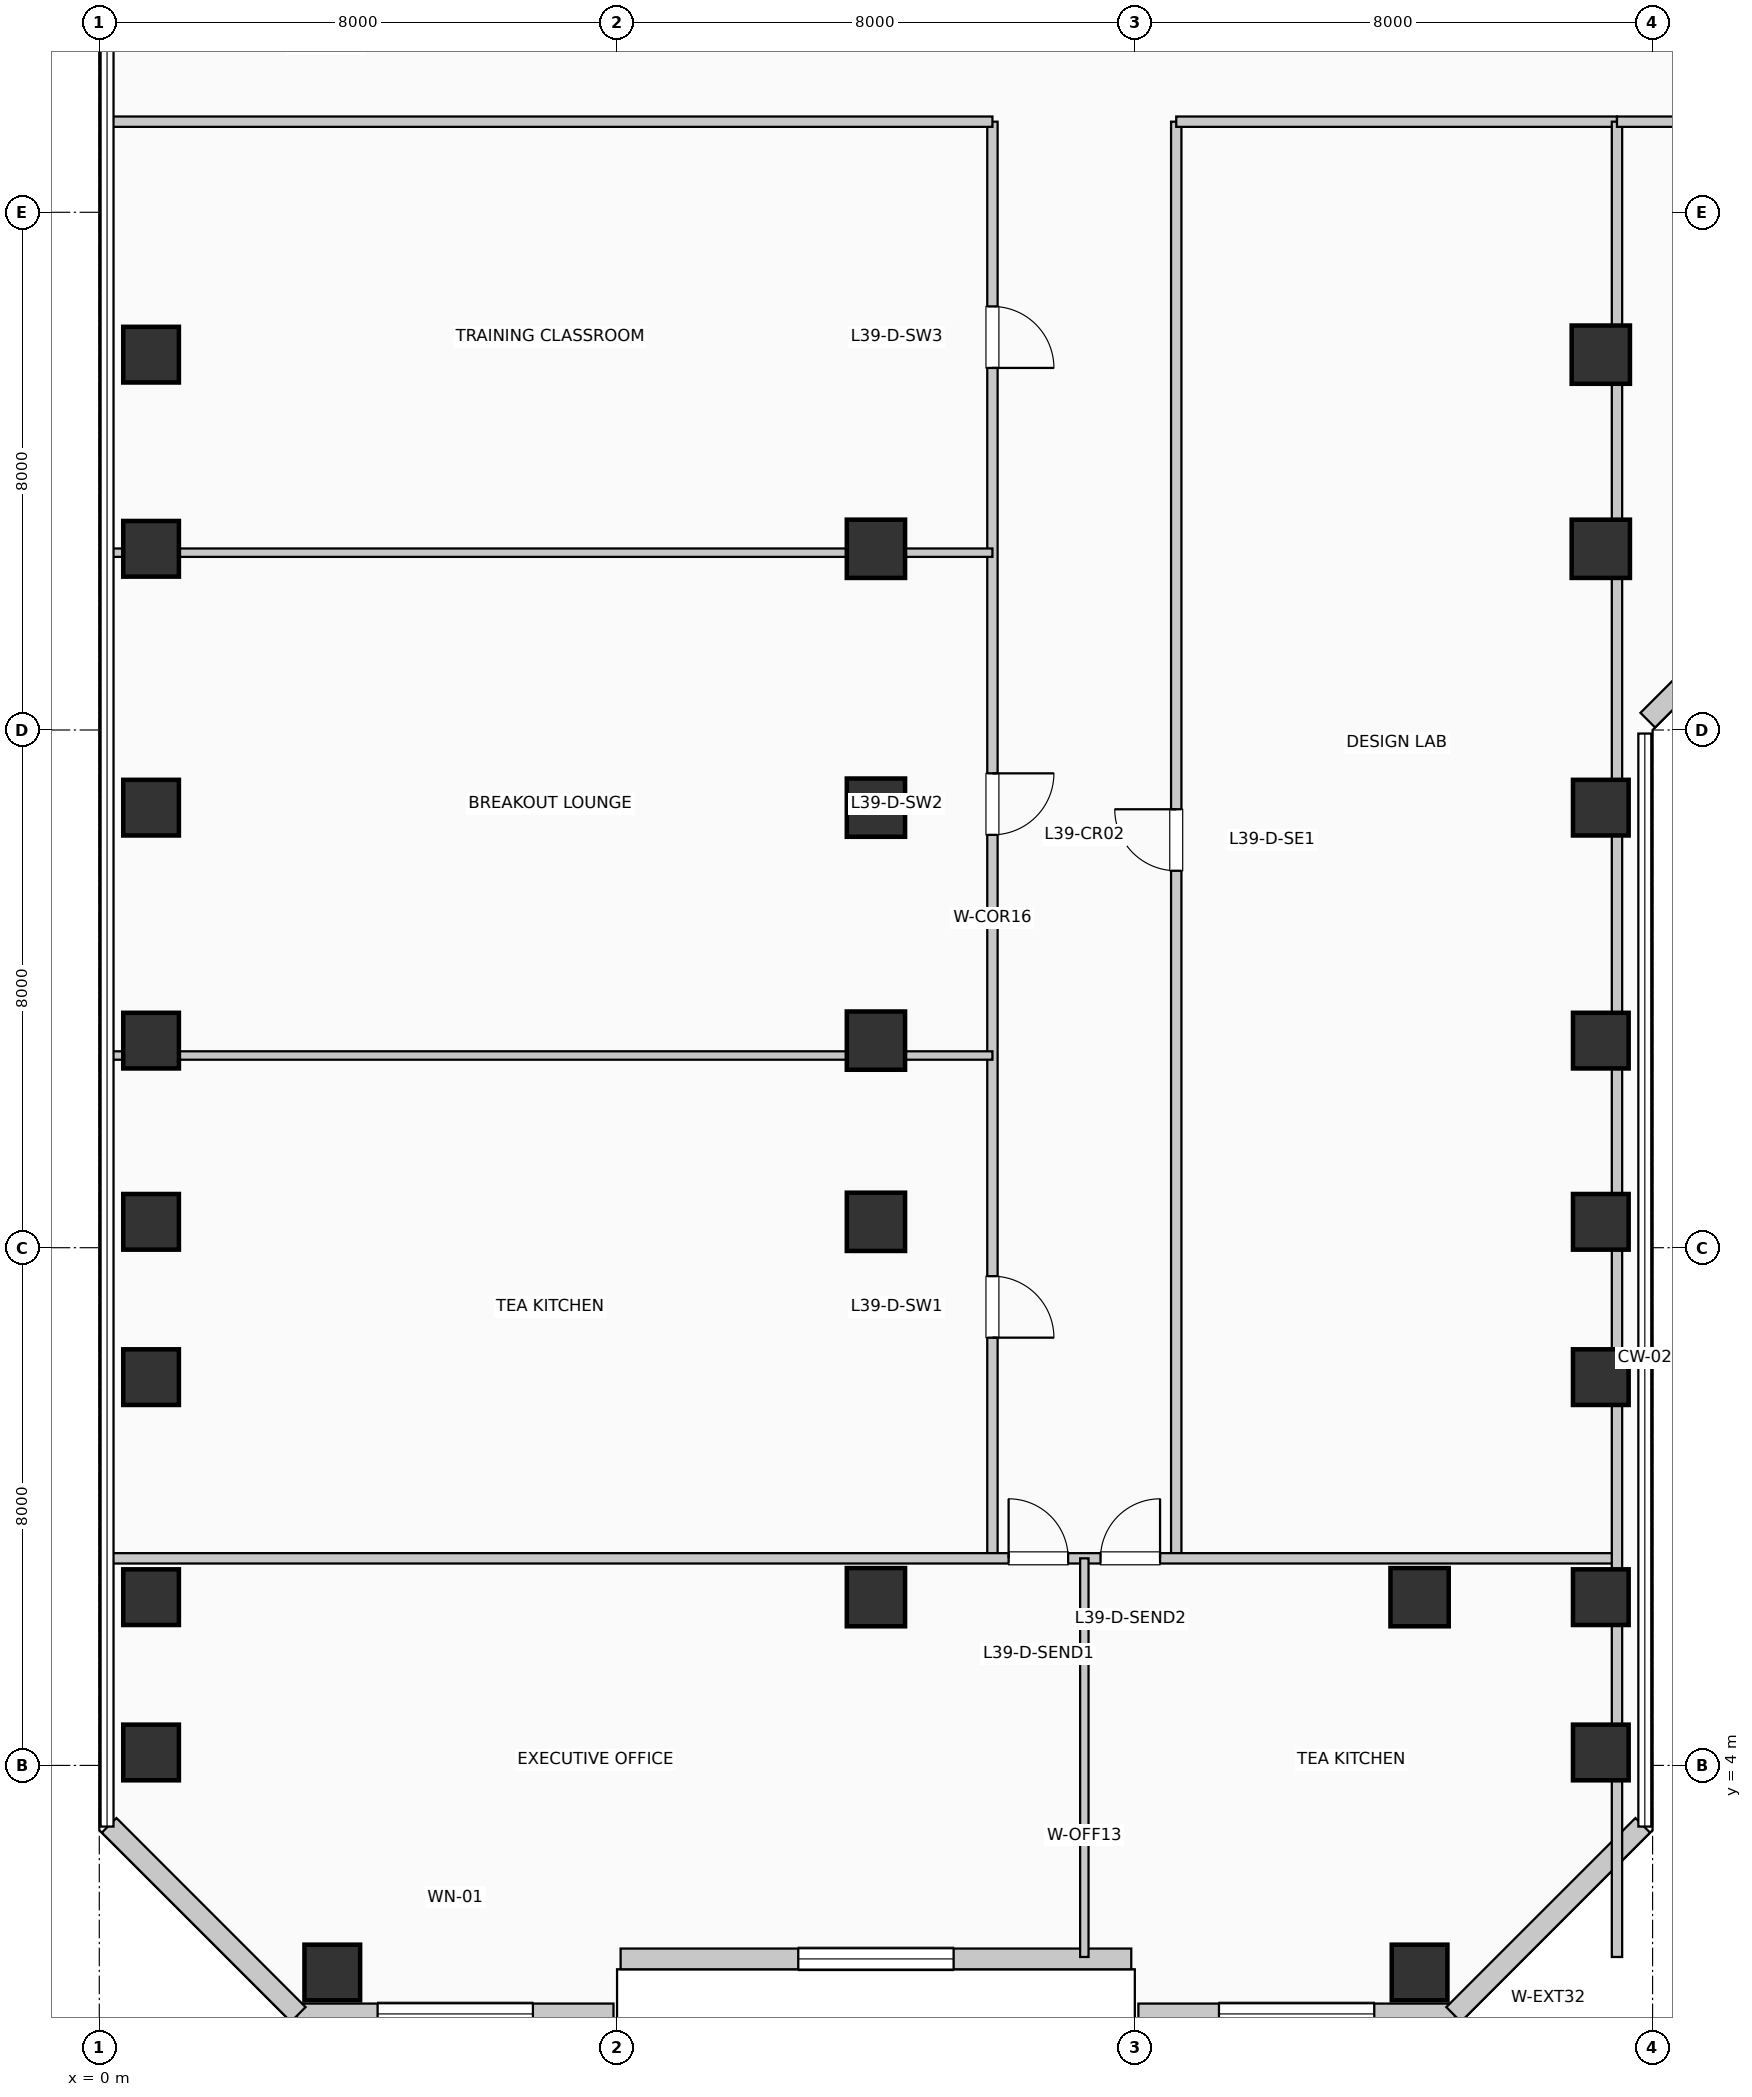
"""IFC4 building model, lengths in metres.
Left out: names, types, materials, properties, quantities, classifications, styles, units other than length and angle.
Written with IfcOpenShell. Run it as: python <this file> out.ifc"""

import sys

from ifc_helpers import new_model, si_unit, direction, frame, frame_2d, origin, origin_2d, place, context, subcontext, project, spatial, rectangle, extrude, element, fill, save


model = new_model("IFC4")
c1 = context("Model", 3, precision=1e-05, world=origin(), true_north=direction((0.0, 1.0)))
c2 = subcontext(c1, "Body", "Model", "MODEL_VIEW")
j1 = project(units=[si_unit("LENGTHUNIT", "METRE"), si_unit("PLANEANGLEUNIT", "RADIAN")], contexts=[c1])
p1 = place(None, origin())
s1 = spatial("IfcSite", under=j1, at=p1, CompositionType="ELEMENT")
p2 = place(p1, origin())
s2 = spatial("IfcBuilding", under=s1, at=p2, CompositionType="ELEMENT")
p3 = place(p2, frame((0.0, 0.0, 162.69)))
s3 = spatial("IfcBuildingStorey", under=s2, at=p3, CompositionType="ELEMENT", Elevation=162.69)
for number, where, z_axis, x_axis in (
    (1, (0.8, 4.2, 0.0), (0.0, 0.0, 1.0), (1.0, 0.0, 0.0)),
    (2, (0.8, 6.6, 0.0), (0.0, 0.0, 1.0), (1.0, 0.0, 0.0)),
    (3, (0.8, 10.0, 0.0), (0.0, 0.0, 1.0), (1.0, 0.0, 0.0)),
    (4, (0.8, 12.4, 0.0), (0.0, 0.0, 1.0), (1.0, 0.0, 0.0)),
    (5, (0.8, 15.2, 0.0), (0.0, 0.0, 1.0), (1.0, 0.0, 0.0)),
    (6, (0.8, 18.8, 0.0), (0.0, 0.0, 1.0), (1.0, 0.0, 0.0)),
    (7, (0.8, 22.8, 0.0), (0.0, 0.0, 1.0), (1.0, 0.0, 0.0)),
    (8, (0.8, 25.8, 0.0), (0.0, 0.0, 1.0), (1.0, 0.0, 0.0)),
    (9, (3.6, 0.8, 0.0), (0.0, 0.0, 1.0), (1.0, 0.0, 0.0)),
):
    element("IfcColumn", number, at=place(p3, frame(where, z_axis=z_axis, x_axis=x_axis)), inside=s3, PredefinedType="COLUMN", context=c2, shape_type="SweptSolid", body=[
        extrude(rectangle(XDim=0.86, YDim=0.86, at=origin_2d()), origin(), (0.0, 0.0, 1.0), 3.96),
    ])
for number, where, z_axis, x_axis in (
    (10, (12.0, 6.6, 0.0), (0.0, 0.0, 1.0), (1.0, 0.0, 0.0)),
    (11, (12.0, 12.4, 0.0), (0.0, 0.0, 1.0), (1.0, 0.0, 0.0)),
    (12, (12.0, 15.2, 0.0), (0.0, 0.0, 1.0), (1.0, 0.0, 0.0)),
    (13, (12.0, 18.8, 0.0), (0.0, 0.0, 1.0), (1.0, 0.0, 0.0)),
    (14, (12.0, 22.8, 0.0), (0.0, 0.0, 1.0), (1.0, 0.0, 0.0)),
):
    element("IfcColumn", number, at=place(p3, frame(where, z_axis=z_axis, x_axis=x_axis)), inside=s3, PredefinedType="COLUMN", context=c2, shape_type="SweptSolid", body=[
        extrude(rectangle(XDim=0.9, YDim=0.9, at=origin_2d()), origin(), (0.0, 0.0, 1.0), 3.96),
    ])
p4 = place(p3, frame((20.4, 0.8, 0.0), z_axis=(0.0, 0.0, 1.0), x_axis=(1.0, 0.0, 0.0)))
e15 = element("IfcColumn", 15, at=p4, inside=s3, PredefinedType="COLUMN", context=c2, shape_type="SweptSolid", body=[
    extrude(rectangle(XDim=0.86, YDim=0.86, at=origin_2d()), origin(), (0.0, 0.0, 1.0), 3.96),
])
p5 = place(p3, frame((20.4, 6.6, 0.0), z_axis=(0.0, 0.0, 1.0), x_axis=(1.0, 0.0, 0.0)))
e16 = element("IfcColumn", 16, at=p5, inside=s3, PredefinedType="COLUMN", context=c2, shape_type="SweptSolid", body=[
    extrude(rectangle(XDim=0.9, YDim=0.9, at=origin_2d()), origin(), (0.0, 0.0, 1.0), 3.96),
])
for number, where, z_axis, x_axis in (
    (17, (23.2, 4.2, 0.0), (0.0, 0.0, 1.0), (1.0, 0.0, 0.0)),
    (18, (23.2, 6.6, 0.0), (0.0, 0.0, 1.0), (1.0, 0.0, 0.0)),
    (19, (23.2, 10.0, 0.0), (0.0, 0.0, 1.0), (1.0, 0.0, 0.0)),
    (20, (23.2, 12.4, 0.0), (0.0, 0.0, 1.0), (1.0, 0.0, 0.0)),
    (21, (23.2, 15.2, 0.0), (0.0, 0.0, 1.0), (1.0, 0.0, 0.0)),
    (22, (23.2, 18.8, 0.0), (0.0, 0.0, 1.0), (1.0, 0.0, 0.0)),
):
    element("IfcColumn", number, at=place(p3, frame(where, z_axis=z_axis, x_axis=x_axis)), inside=s3, PredefinedType="COLUMN", context=c2, shape_type="SweptSolid", body=[
        extrude(rectangle(XDim=0.86, YDim=0.86, at=origin_2d()), origin(), (0.0, 0.0, 1.0), 3.96),
    ])
for number, where, z_axis, x_axis in (
    (23, (23.2, 22.8, 0.0), (0.0, 0.0, 1.0), (1.0, 0.0, 0.0)),
    (24, (23.2, 25.8, 0.0), (0.0, 0.0, 1.0), (1.0, 0.0, 0.0)),
):
    element("IfcColumn", number, at=place(p3, frame(where, z_axis=z_axis, x_axis=x_axis)), inside=s3, PredefinedType="COLUMN", context=c2, shape_type="SweptSolid", body=[
        extrude(rectangle(XDim=0.9, YDim=0.9, at=origin_2d()), origin(), (0.0, 0.0, 1.0), 3.96),
    ])
p6 = place(p3, frame((3.055, 0.16, 0.0), z_axis=(0.0, 0.0, 1.0), x_axis=(1.0, 0.0, 0.0)))
e25 = element("IfcWall", 25, at=p6, inside=s3, PredefinedType="SOLIDWALL", context=c2, shape_type="SweptSolid", body=[
    extrude(rectangle(XDim=4.89, YDim=0.32, at=frame_2d((2.445, 0.0))), origin(), (0.0, 0.0, 1.0), 3.71),
])
p7 = place(p6, frame((1.245, 0.0, 0.85)))
e26 = element("IfcOpeningElement", 26, at=p7, cuts=e25, PredefinedType="OPENING", context=c2, shape_type="SweptSolid", body=[
    extrude(rectangle(XDim=2.4, YDim=2.05, at=frame_2d((1.2, 1.025))), frame((0.0, 0.17, 0.0), z_axis=(0.0, -1.0, 0.0), x_axis=(1.0, 0.0, 0.0)), (0.0, 0.0, 1.0), 0.34),
])
p8 = place(p3, frame((8.055, 1.01, 0.0), z_axis=(0.0, 0.0, 1.0), x_axis=(1.0, 0.0, 0.0)))
e27 = element("IfcWall", 27, at=p8, inside=s3, PredefinedType="SOLIDWALL", context=c2, shape_type="SweptSolid", body=[
    extrude(rectangle(XDim=7.89, YDim=0.32, at=frame_2d((3.945, 0.0))), origin(), (0.0, 0.0, 1.0), 3.71),
])
p9 = place(p8, frame((2.745, 0.0, 0.85)))
e28 = element("IfcOpeningElement", 28, at=p9, cuts=e27, PredefinedType="OPENING", context=c2, shape_type="SweptSolid", body=[
    extrude(rectangle(XDim=2.4, YDim=2.05, at=frame_2d((1.2, 1.025))), frame((0.0, 0.17, 0.0), z_axis=(0.0, -1.0, 0.0), x_axis=(1.0, 0.0, 0.0)), (0.0, 0.0, 1.0), 0.34),
])
p10 = place(p3, frame((16.055, 0.16, 0.0), z_axis=(0.0, 0.0, 1.0), x_axis=(1.0, 0.0, 0.0)))
e29 = element("IfcWall", 29, at=p10, inside=s3, PredefinedType="SOLIDWALL", context=c2, shape_type="SweptSolid", body=[
    extrude(rectangle(XDim=4.89, YDim=0.32, at=frame_2d((2.445, 0.0))), origin(), (0.0, 0.0, 1.0), 3.71),
])
p11 = place(p10, frame((1.245, 0.0, 0.85)))
e30 = element("IfcOpeningElement", 30, at=p11, cuts=e29, PredefinedType="OPENING", context=c2, shape_type="SweptSolid", body=[
    extrude(rectangle(XDim=2.4, YDim=2.05, at=frame_2d((1.2, 1.025))), frame((0.0, 0.17, 0.0), z_axis=(0.0, -1.0, 0.0), x_axis=(1.0, 0.0, 0.0)), (0.0, 0.0, 1.0), 0.34),
])
p12 = place(p3, frame((20.926, 0.152, 0.0), z_axis=(0.0, 0.0, 1.0), x_axis=(0.707106781187, 0.707106781187, 0.0)))
e31 = element("IfcWall", 31, at=p12, inside=s3, PredefinedType="SOLIDWALL", context=c2, shape_type="SweptSolid", body=[
    extrude(rectangle(XDim=4.133, YDim=0.32, at=frame_2d((2.066, 0.0))), origin(), (0.0, 0.0, 1.0), 3.71),
])
p13 = place(p3, frame((23.926, 20.152, 0.0), z_axis=(0.0, 0.0, 1.0), x_axis=(0.707106781187, 0.707106781187, 0.0)))
e32 = element("IfcWall", 32, at=p13, inside=s3, PredefinedType="SOLIDWALL", context=c2, shape_type="SweptSolid", body=[
    extrude(rectangle(XDim=2.718, YDim=0.32, at=frame_2d((1.359, 0.0))), origin(), (0.0, 0.0, 1.0), 3.71),
])
p14 = place(p3, frame((0.152, 3.074, 0.0), z_axis=(0.0, 0.0, 1.0), x_axis=(0.707106781187, -0.707106781187, 0.0)))
e33 = element("IfcWall", 33, at=p14, inside=s3, PredefinedType="SOLIDWALL", context=c2, shape_type="SweptSolid", body=[
    extrude(rectangle(XDim=4.133, YDim=0.32, at=frame_2d((2.066, 0.0))), origin(), (0.0, 0.0, 1.0), 3.71),
])
p15 = place(p3, frame((13.8, 7.2, 0.0), z_axis=(0.0, 0.0, 1.0), x_axis=(0.0, 1.0, 0.0)))
e34 = element("IfcWall", 34, at=p15, inside=s3, PredefinedType="PARTITIONING", context=c2, shape_type="SweptSolid", body=[
    extrude(rectangle(XDim=22.2, YDim=0.16, at=frame_2d((11.1, 0.0))), origin(), (0.0, 0.0, 1.0), 3.71),
])
p16 = place(p15, frame((4.36, 0.0, 0.0), z_axis=(0.0, 0.0, 1.0), x_axis=(-1.0, 0.0, 0.0)))
e35 = element("IfcOpeningElement", 35, at=p16, cuts=e34, PredefinedType="OPENING", context=c2, shape_type="SweptSolid", body=[
    extrude(rectangle(XDim=0.95, YDim=2.15, at=frame_2d((0.475, 1.075))), frame((0.0, 0.09, 0.0), z_axis=(0.0, -1.0, 0.0), x_axis=(1.0, 0.0, 0.0)), (0.0, 0.0, 1.0), 0.18),
])
p17 = place(p15, frame((12.13, 0.0, 0.0), z_axis=(0.0, 0.0, 1.0), x_axis=(-1.0, 0.0, 0.0)))
e36 = element("IfcOpeningElement", 36, at=p17, cuts=e34, PredefinedType="OPENING", context=c2, shape_type="SweptSolid", body=[
    extrude(rectangle(XDim=0.95, YDim=2.15, at=frame_2d((0.475, 1.075))), frame((0.0, 0.09, 0.0), z_axis=(0.0, -1.0, 0.0), x_axis=(1.0, 0.0, 0.0)), (0.0, 0.0, 1.0), 0.18),
])
p18 = place(p15, frame((19.345, 0.0, 0.0), z_axis=(0.0, 0.0, 1.0), x_axis=(-1.0, 0.0, 0.0)))
e37 = element("IfcOpeningElement", 37, at=p18, cuts=e34, PredefinedType="OPENING", context=c2, shape_type="SweptSolid", body=[
    extrude(rectangle(XDim=0.95, YDim=2.15, at=frame_2d((0.475, 1.075))), frame((0.0, 0.09, 0.0), z_axis=(0.0, -1.0, 0.0), x_axis=(1.0, 0.0, 0.0)), (0.0, 0.0, 1.0), 0.18),
])
p19 = place(p3, frame((16.64, 7.2, 0.0), z_axis=(0.0, 0.0, 1.0), x_axis=(0.0, 1.0, 0.0)))
e38 = element("IfcWall", 38, at=p19, inside=s3, PredefinedType="PARTITIONING", context=c2, shape_type="SweptSolid", body=[
    extrude(rectangle(XDim=22.2, YDim=0.16, at=frame_2d((11.1, 0.0))), origin(), (0.0, 0.0, 1.0), 3.71),
])
p20 = place(p19, frame((10.625, 0.0, 0.0)))
e39 = element("IfcOpeningElement", 39, at=p20, cuts=e38, PredefinedType="OPENING", context=c2, shape_type="SweptSolid", body=[
    extrude(rectangle(XDim=0.95, YDim=2.15, at=frame_2d((0.475, 1.075))), frame((0.0, 0.09, 0.0), z_axis=(0.0, -1.0, 0.0), x_axis=(1.0, 0.0, 0.0)), (0.0, 0.0, 1.0), 0.18),
])
p21 = place(p3, frame((0.19, 7.2, 0.0), z_axis=(0.0, 0.0, 1.0), x_axis=(1.0, 0.0, 0.0)))
e40 = element("IfcWall", 40, at=p21, inside=s3, PredefinedType="PARTITIONING", context=c2, shape_type="SweptSolid", body=[
    extrude(rectangle(XDim=23.26, YDim=0.16, at=frame_2d((11.63, 0.0))), origin(), (0.0, 0.0, 1.0), 3.71),
])
p22 = place(p21, frame((13.86, 0.0, 0.0)))
e41 = element("IfcOpeningElement", 41, at=p22, cuts=e40, PredefinedType="OPENING", context=c2, shape_type="SweptSolid", body=[
    extrude(rectangle(XDim=0.92, YDim=2.1, at=frame_2d((0.46, 1.05))), frame((0.0, 0.09, 0.0), z_axis=(0.0, -1.0, 0.0), x_axis=(1.0, 0.0, 0.0)), (0.0, 0.0, 1.0), 0.18),
])
p23 = place(p21, frame((15.28, 0.0, 0.0)))
e42 = element("IfcOpeningElement", 42, at=p23, cuts=e40, PredefinedType="OPENING", context=c2, shape_type="SweptSolid", body=[
    extrude(rectangle(XDim=0.92, YDim=2.1, at=frame_2d((0.46, 1.05))), frame((0.0, 0.09, 0.0), z_axis=(0.0, -1.0, 0.0), x_axis=(1.0, 0.0, 0.0)), (0.0, 0.0, 1.0), 0.18),
])
p24 = place(p3, frame((0.19, 29.4, 0.0), z_axis=(0.0, 0.0, 1.0), x_axis=(1.0, 0.0, 0.0)))
e43 = element("IfcWall", 43, at=p24, inside=s3, PredefinedType="PARTITIONING", context=c2, shape_type="SweptSolid", body=[
    extrude(rectangle(XDim=13.61, YDim=0.16, at=frame_2d((6.805, 0.0))), origin(), (0.0, 0.0, 1.0), 3.365),
])
p25 = place(p3, frame((16.64, 29.4, 0.0), z_axis=(0.0, 0.0, 1.0), x_axis=(1.0, 0.0, 0.0)))
e44 = element("IfcWall", 44, at=p25, inside=s3, PredefinedType="PARTITIONING", context=c2, shape_type="SweptSolid", body=[
    extrude(rectangle(XDim=6.81, YDim=0.16, at=frame_2d((3.405, 0.0))), origin(), (0.0, 0.0, 1.0), 3.71),
])
p26 = place(p3, frame((23.45, 1.04, 0.0), z_axis=(0.0, 0.0, 1.0), x_axis=(0.0, 1.0, 0.0)))
e45 = element("IfcWall", 45, at=p26, inside=s3, PredefinedType="PARTITIONING", context=c2, shape_type="SweptSolid", body=[
    extrude(rectangle(XDim=28.36, YDim=0.16, at=frame_2d((14.18, 0.0))), origin(), (0.0, 0.0, 1.0), 3.045),
])
p27 = place(p3, frame((15.22, 1.04, 0.0), z_axis=(0.0, 0.0, 1.0), x_axis=(0.0, 1.0, 0.0)))
e46 = element("IfcWall", 46, at=p27, inside=s3, PredefinedType="PARTITIONING", context=c2, shape_type="SweptSolid", body=[
    extrude(rectangle(XDim=6.16, YDim=0.13, at=frame_2d((3.08, 0.0))), origin(), (0.0, 0.0, 1.0), 3.71),
])
for number, where, z_axis, x_axis in (
    (47, (0.19, 14.97, 0.0), (0.0, 0.0, 1.0), (1.0, 0.0, 0.0)),
    (48, (0.19, 22.74, 0.0), (0.0, 0.0, 1.0), (1.0, 0.0, 0.0)),
):
    element("IfcWall", number, at=place(p3, frame(where, z_axis=z_axis, x_axis=x_axis)), inside=s3, PredefinedType="PARTITIONING", context=c2, shape_type="SweptSolid", body=[
        extrude(rectangle(XDim=13.61, YDim=0.13, at=frame_2d((6.805, 0.0))), origin(), (0.0, 0.0, 1.0), 3.045),
    ])
p28 = place(p3, frame((23.45, 29.4, 0.0), z_axis=(0.0, 0.0, 1.0), x_axis=(1.0, 0.0, 0.0)))
e49 = element("IfcWall", 49, at=p28, inside=s3, PredefinedType="PARTITIONING", context=c2, shape_type="SweptSolid", body=[
    extrude(rectangle(XDim=26.56, YDim=0.16, at=frame_2d((13.28, 0.0))), origin(), (0.0, 0.0, 1.0), 3.365),
])
p29 = place(p28, frame((13.755, 0.0, 0.0), z_axis=(0.0, 0.0, 1.0), x_axis=(-1.0, 0.0, 0.0)))
e50 = element("IfcOpeningElement", 50, at=p29, cuts=e49, PredefinedType="OPENING", context=c2, shape_type="SweptSolid", body=[
    extrude(rectangle(XDim=0.95, YDim=2.15, at=frame_2d((0.475, 1.075))), frame((0.0, 0.09, 0.0), z_axis=(0.0, -1.0, 0.0), x_axis=(1.0, 0.0, 0.0)), (0.0, 0.0, 1.0), 0.18),
])
p30 = place(p7, origin())
e51 = element("IfcWindow", 51, at=p30, inside=s3, PartitioningType="SINGLE_PANEL", PredefinedType="WINDOW", context=c2, shape_type="SweptSolid", body=[
    extrude(rectangle(XDim=2.4, YDim=2.05, at=frame_2d((1.2, 1.025))), frame((0.0, 0.03, 0.0), z_axis=(0.0, -1.0, 0.0), x_axis=(1.0, 0.0, 0.0)), (0.0, 0.0, 1.0), 0.06),
])
fill(e26, e51)
p31 = place(p9, origin())
e52 = element("IfcWindow", 52, at=p31, inside=s3, PartitioningType="SINGLE_PANEL", PredefinedType="WINDOW", context=c2, shape_type="SweptSolid", body=[
    extrude(rectangle(XDim=2.4, YDim=2.05, at=frame_2d((1.2, 1.025))), frame((0.0, 0.03, 0.0), z_axis=(0.0, -1.0, 0.0), x_axis=(1.0, 0.0, 0.0)), (0.0, 0.0, 1.0), 0.06),
])
fill(e28, e52)
p32 = place(p11, origin())
e53 = element("IfcWindow", 53, at=p32, inside=s3, PartitioningType="SINGLE_PANEL", PredefinedType="WINDOW", context=c2, shape_type="SweptSolid", body=[
    extrude(rectangle(XDim=2.4, YDim=2.05, at=frame_2d((1.2, 1.025))), frame((0.0, 0.03, 0.0), z_axis=(0.0, -1.0, 0.0), x_axis=(1.0, 0.0, 0.0)), (0.0, 0.0, 1.0), 0.06),
])
fill(e30, e53)
p33 = place(p22, origin())
e54 = element("IfcDoor", 54, at=p33, inside=s3, OperationType="SINGLE_SWING_LEFT", PredefinedType="DOOR", context=c2, shape_type="SweptSolid", body=[
    extrude(rectangle(XDim=0.92, YDim=2.1, at=frame_2d((0.46, 1.05))), frame((0.0, 0.025, 0.0), z_axis=(0.0, -1.0, 0.0), x_axis=(1.0, 0.0, 0.0)), (0.0, 0.0, 1.0), 0.05),
])
fill(e41, e54)
p34 = place(p23, origin())
e55 = element("IfcDoor", 55, at=p34, inside=s3, OperationType="SINGLE_SWING_RIGHT", PredefinedType="DOOR", context=c2, shape_type="SweptSolid", body=[
    extrude(rectangle(XDim=0.92, YDim=2.1, at=frame_2d((0.46, 1.05))), frame((0.0, 0.025, 0.0), z_axis=(0.0, -1.0, 0.0), x_axis=(1.0, 0.0, 0.0)), (0.0, 0.0, 1.0), 0.05),
])
fill(e42, e55)
p35 = place(p16, origin())
e56 = element("IfcDoor", 56, at=p35, inside=s3, OperationType="SINGLE_SWING_LEFT", PredefinedType="DOOR", context=c2, shape_type="SweptSolid", body=[
    extrude(rectangle(XDim=0.95, YDim=2.15, at=frame_2d((0.475, 1.075))), frame((0.0, 0.025, 0.0), z_axis=(0.0, -1.0, 0.0), x_axis=(1.0, 0.0, 0.0)), (0.0, 0.0, 1.0), 0.05),
])
fill(e35, e56)
p36 = place(p17, origin())
e57 = element("IfcDoor", 57, at=p36, inside=s3, OperationType="SINGLE_SWING_RIGHT", PredefinedType="DOOR", context=c2, shape_type="SweptSolid", body=[
    extrude(rectangle(XDim=0.95, YDim=2.15, at=frame_2d((0.475, 1.075))), frame((0.0, 0.025, 0.0), z_axis=(0.0, -1.0, 0.0), x_axis=(1.0, 0.0, 0.0)), (0.0, 0.0, 1.0), 0.05),
])
fill(e36, e57)
p37 = place(p18, origin())
e58 = element("IfcDoor", 58, at=p37, inside=s3, OperationType="SINGLE_SWING_LEFT", PredefinedType="DOOR", context=c2, shape_type="SweptSolid", body=[
    extrude(rectangle(XDim=0.95, YDim=2.15, at=frame_2d((0.475, 1.075))), frame((0.0, 0.025, 0.0), z_axis=(0.0, -1.0, 0.0), x_axis=(1.0, 0.0, 0.0)), (0.0, 0.0, 1.0), 0.05),
])
fill(e37, e58)
p38 = place(p20, origin())
e59 = element("IfcDoor", 59, at=p38, inside=s3, OperationType="SINGLE_SWING_RIGHT", PredefinedType="DOOR", context=c2, shape_type="SweptSolid", body=[
    extrude(rectangle(XDim=0.95, YDim=2.15, at=frame_2d((0.475, 1.075))), frame((0.0, 0.025, 0.0), z_axis=(0.0, -1.0, 0.0), x_axis=(1.0, 0.0, 0.0)), (0.0, 0.0, 1.0), 0.05),
])
fill(e39, e59)
save(model, sys.argv[1])
